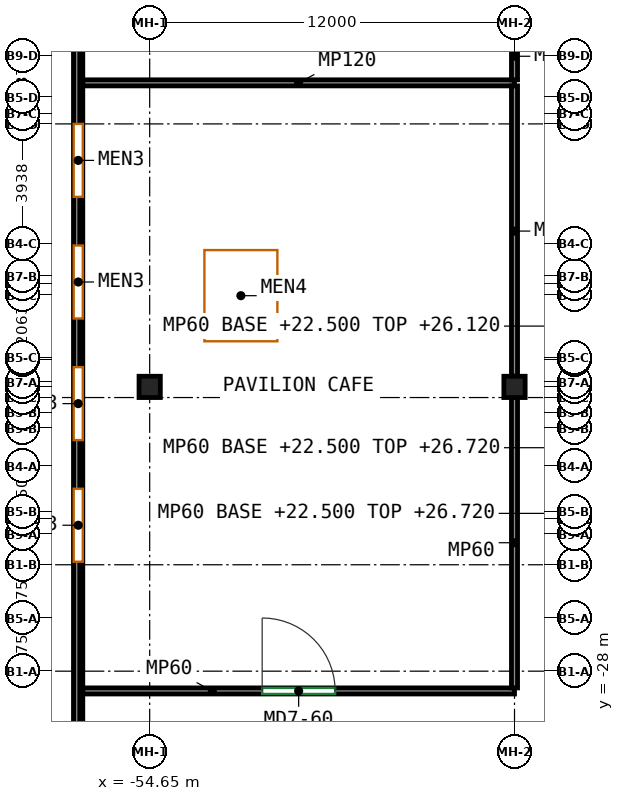
"""IFC4 building model, lengths in metres.
Left out: names, types, materials, properties, quantities, classifications, styles, units other than length and angle.
Written with IfcOpenShell. Run it as: python <this file> out.ifc"""

import sys

from ifc_helpers import new_model, si_unit, direction, frame, frame_2d, origin, origin_2d, place, context, subcontext, project, spatial, rectangle, extrude, source, transform, mapped, element, fill, save


model = new_model("IFC4")
c1 = context("Model", 3, precision=1e-05, world=origin(), true_north=direction((0.0, 1.0)))
c2 = subcontext(c1, "Body", "Model", "MODEL_VIEW")
j1 = project(units=[si_unit("LENGTHUNIT", "METRE"), si_unit("PLANEANGLEUNIT", "RADIAN")], contexts=[c1])
p1 = place(None, origin())
s1 = spatial("IfcSite", under=j1, at=p1, CompositionType="ELEMENT")
p2 = place(p1, origin())
s2 = spatial("IfcBuilding", under=s1, at=p2, CompositionType="ELEMENT")
p3 = place(p2, frame((0.0, 0.0, 22.5)))
s3 = spatial("IfcBuildingStorey", under=s2, at=p3, CompositionType="ELEMENT", Elevation=22.5)
m1 = source(origin(), c2, "Body", "SweptSolid", [
    extrude(rectangle(XDim=0.7, YDim=0.7, at=origin_2d()), origin(), (0.0, 0.0, 1.0), 4.22),
])
for number, where, z_axis, x_axis in (
    (1, (-54.65, -18.65, 0.0), (0.0, 0.0, 1.0), (1.0, 0.0, 0.0)),
    (2, (-42.65, -18.65, 0.0), (0.0, 0.0, 1.0), (1.0, 0.0, 0.0)),
):
    element("IfcColumn", number, at=place(p3, frame(where, z_axis=z_axis, x_axis=x_axis)), inside=s3, PredefinedType="COLUMN", context=c2, shape_type="MappedRepresentation", body=[
        mapped(m1, transform((0.0, 0.0, 0.0))),
    ])
m2 = source(origin(), c2, "Body", "SweptSolid", [
    extrude(rectangle(XDim=100.7, YDim=0.3, at=frame_2d((50.35, 0.0))), origin(), (0.0, 0.0, 1.0), 4.22),
])
p4 = place(p3, frame((-57.0, -43.55, 0.0), z_axis=(0.0, 0.0, 1.0), x_axis=(0.0, 1.0, 0.0)))
e3 = element("IfcWall", 3, at=p4, inside=s3, PredefinedType="SOLIDWALL", context=c2, shape_type="MappedRepresentation", body=[
    mapped(m2, transform((0.0, 0.0, 0.0))),
])
p5 = place(p4, frame((3.15, 0.0, 0.9)))
e4 = element("IfcOpeningElement", 4, at=p5, cuts=e3, PredefinedType="OPENING", context=c2, shape_type="SweptSolid", body=[
    extrude(rectangle(XDim=2.4, YDim=1.8, at=frame_2d((1.2, 0.9))), frame((0.0, 0.16, 0.0), z_axis=(0.0, -1.0, 0.0), x_axis=(1.0, 0.0, 0.0)), (0.0, 0.0, 1.0), 0.32),
])
p6 = place(p4, frame((7.15, 0.0, 0.9)))
e5 = element("IfcOpeningElement", 5, at=p6, cuts=e3, PredefinedType="OPENING", context=c2, shape_type="SweptSolid", body=[
    extrude(rectangle(XDim=2.4, YDim=1.8, at=frame_2d((1.2, 0.9))), frame((0.0, 0.16, 0.0), z_axis=(0.0, -1.0, 0.0), x_axis=(1.0, 0.0, 0.0)), (0.0, 0.0, 1.0), 0.32),
])
p7 = place(p4, frame((11.15, 0.0, 0.9)))
e6 = element("IfcOpeningElement", 6, at=p7, cuts=e3, PredefinedType="OPENING", context=c2, shape_type="SweptSolid", body=[
    extrude(rectangle(XDim=2.4, YDim=1.8, at=frame_2d((1.2, 0.9))), frame((0.0, 0.16, 0.0), z_axis=(0.0, -1.0, 0.0), x_axis=(1.0, 0.0, 0.0)), (0.0, 0.0, 1.0), 0.32),
])
p8 = place(p4, frame((19.15, 0.0, 0.9)))
e7 = element("IfcOpeningElement", 7, at=p8, cuts=e3, PredefinedType="OPENING", context=c2, shape_type="SweptSolid", body=[
    extrude(rectangle(XDim=2.4, YDim=1.8, at=frame_2d((1.2, 0.9))), frame((0.0, 0.16, 0.0), z_axis=(0.0, -1.0, 0.0), x_axis=(1.0, 0.0, 0.0)), (0.0, 0.0, 1.0), 0.32),
])
p9 = place(p4, frame((23.15, 0.0, 0.9)))
e8 = element("IfcOpeningElement", 8, at=p9, cuts=e3, PredefinedType="OPENING", context=c2, shape_type="SweptSolid", body=[
    extrude(rectangle(XDim=2.4, YDim=1.8, at=frame_2d((1.2, 0.9))), frame((0.0, 0.16, 0.0), z_axis=(0.0, -1.0, 0.0), x_axis=(1.0, 0.0, 0.0)), (0.0, 0.0, 1.0), 0.32),
])
p10 = place(p4, frame((27.15, 0.0, 0.9)))
e9 = element("IfcOpeningElement", 9, at=p10, cuts=e3, PredefinedType="OPENING", context=c2, shape_type="SweptSolid", body=[
    extrude(rectangle(XDim=2.4, YDim=1.8, at=frame_2d((1.2, 0.9))), frame((0.0, 0.16, 0.0), z_axis=(0.0, -1.0, 0.0), x_axis=(1.0, 0.0, 0.0)), (0.0, 0.0, 1.0), 0.32),
])
p11 = place(p4, frame((31.15, 0.0, 0.9)))
e10 = element("IfcOpeningElement", 10, at=p11, cuts=e3, PredefinedType="OPENING", context=c2, shape_type="SweptSolid", body=[
    extrude(rectangle(XDim=2.4, YDim=1.8, at=frame_2d((1.2, 0.9))), frame((0.0, 0.16, 0.0), z_axis=(0.0, -1.0, 0.0), x_axis=(1.0, 0.0, 0.0)), (0.0, 0.0, 1.0), 0.32),
])
p12 = place(p4, frame((39.15, 0.0, 0.9)))
e11 = element("IfcOpeningElement", 11, at=p12, cuts=e3, PredefinedType="OPENING", context=c2, shape_type="SweptSolid", body=[
    extrude(rectangle(XDim=2.4, YDim=1.8, at=frame_2d((1.2, 0.9))), frame((0.0, 0.16, 0.0), z_axis=(0.0, -1.0, 0.0), x_axis=(1.0, 0.0, 0.0)), (0.0, 0.0, 1.0), 0.32),
])
p13 = place(p4, frame((43.15, 0.0, 0.9)))
e12 = element("IfcOpeningElement", 12, at=p13, cuts=e3, PredefinedType="OPENING", context=c2, shape_type="SweptSolid", body=[
    extrude(rectangle(XDim=2.4, YDim=1.8, at=frame_2d((1.2, 0.9))), frame((0.0, 0.16, 0.0), z_axis=(0.0, -1.0, 0.0), x_axis=(1.0, 0.0, 0.0)), (0.0, 0.0, 1.0), 0.32),
])
p14 = place(p4, frame((51.15, 0.0, 0.9)))
e13 = element("IfcOpeningElement", 13, at=p14, cuts=e3, PredefinedType="OPENING", context=c2, shape_type="SweptSolid", body=[
    extrude(rectangle(XDim=2.4, YDim=1.8, at=frame_2d((1.2, 0.9))), frame((0.0, 0.16, 0.0), z_axis=(0.0, -1.0, 0.0), x_axis=(1.0, 0.0, 0.0)), (0.0, 0.0, 1.0), 0.32),
])
p15 = place(p4, frame((55.15, 0.0, 0.9)))
e14 = element("IfcOpeningElement", 14, at=p15, cuts=e3, PredefinedType="OPENING", context=c2, shape_type="SweptSolid", body=[
    extrude(rectangle(XDim=2.4, YDim=1.8, at=frame_2d((1.2, 0.9))), frame((0.0, 0.16, 0.0), z_axis=(0.0, -1.0, 0.0), x_axis=(1.0, 0.0, 0.0)), (0.0, 0.0, 1.0), 0.32),
])
p16 = place(p4, frame((59.15, 0.0, 0.9)))
e15 = element("IfcOpeningElement", 15, at=p16, cuts=e3, PredefinedType="OPENING", context=c2, shape_type="SweptSolid", body=[
    extrude(rectangle(XDim=2.4, YDim=1.8, at=frame_2d((1.2, 0.9))), frame((0.0, 0.16, 0.0), z_axis=(0.0, -1.0, 0.0), x_axis=(1.0, 0.0, 0.0)), (0.0, 0.0, 1.0), 0.32),
])
p17 = place(p4, frame((63.15, 0.0, 0.9)))
e16 = element("IfcOpeningElement", 16, at=p17, cuts=e3, PredefinedType="OPENING", context=c2, shape_type="SweptSolid", body=[
    extrude(rectangle(XDim=2.4, YDim=1.8, at=frame_2d((1.2, 0.9))), frame((0.0, 0.16, 0.0), z_axis=(0.0, -1.0, 0.0), x_axis=(1.0, 0.0, 0.0)), (0.0, 0.0, 1.0), 0.32),
])
p18 = place(p4, frame((67.15, 0.0, 0.9)))
e17 = element("IfcOpeningElement", 17, at=p18, cuts=e3, PredefinedType="OPENING", context=c2, shape_type="SweptSolid", body=[
    extrude(rectangle(XDim=2.4, YDim=1.8, at=frame_2d((1.2, 0.9))), frame((0.0, 0.16, 0.0), z_axis=(0.0, -1.0, 0.0), x_axis=(1.0, 0.0, 0.0)), (0.0, 0.0, 1.0), 0.32),
])
p19 = place(p4, frame((75.15, 0.0, 0.9)))
e18 = element("IfcOpeningElement", 18, at=p19, cuts=e3, PredefinedType="OPENING", context=c2, shape_type="SweptSolid", body=[
    extrude(rectangle(XDim=2.4, YDim=1.8, at=frame_2d((1.2, 0.9))), frame((0.0, 0.16, 0.0), z_axis=(0.0, -1.0, 0.0), x_axis=(1.0, 0.0, 0.0)), (0.0, 0.0, 1.0), 0.32),
])
p20 = place(p4, frame((79.15, 0.0, 0.9)))
e19 = element("IfcOpeningElement", 19, at=p20, cuts=e3, PredefinedType="OPENING", context=c2, shape_type="SweptSolid", body=[
    extrude(rectangle(XDim=2.4, YDim=1.8, at=frame_2d((1.2, 0.9))), frame((0.0, 0.16, 0.0), z_axis=(0.0, -1.0, 0.0), x_axis=(1.0, 0.0, 0.0)), (0.0, 0.0, 1.0), 0.32),
])
p21 = place(p4, frame((83.15, 0.0, 0.9)))
e20 = element("IfcOpeningElement", 20, at=p21, cuts=e3, PredefinedType="OPENING", context=c2, shape_type="SweptSolid", body=[
    extrude(rectangle(XDim=2.4, YDim=1.8, at=frame_2d((1.2, 0.9))), frame((0.0, 0.16, 0.0), z_axis=(0.0, -1.0, 0.0), x_axis=(1.0, 0.0, 0.0)), (0.0, 0.0, 1.0), 0.32),
])
p22 = place(p4, frame((87.15, 0.0, 0.9)))
e21 = element("IfcOpeningElement", 21, at=p22, cuts=e3, PredefinedType="OPENING", context=c2, shape_type="SweptSolid", body=[
    extrude(rectangle(XDim=2.4, YDim=1.8, at=frame_2d((1.2, 0.9))), frame((0.0, 0.16, 0.0), z_axis=(0.0, -1.0, 0.0), x_axis=(1.0, 0.0, 0.0)), (0.0, 0.0, 1.0), 0.32),
])
p23 = place(p4, frame((91.15, 0.0, 0.9)))
e22 = element("IfcOpeningElement", 22, at=p23, cuts=e3, PredefinedType="OPENING", context=c2, shape_type="SweptSolid", body=[
    extrude(rectangle(XDim=2.4, YDim=1.8, at=frame_2d((1.2, 0.9))), frame((0.0, 0.16, 0.0), z_axis=(0.0, -1.0, 0.0), x_axis=(1.0, 0.0, 0.0)), (0.0, 0.0, 1.0), 0.32),
])
p24 = place(p4, frame((95.15, 0.0, 0.9)))
e23 = element("IfcOpeningElement", 23, at=p24, cuts=e3, PredefinedType="OPENING", context=c2, shape_type="SweptSolid", body=[
    extrude(rectangle(XDim=2.4, YDim=1.8, at=frame_2d((1.2, 0.9))), frame((0.0, 0.16, 0.0), z_axis=(0.0, -1.0, 0.0), x_axis=(1.0, 0.0, 0.0)), (0.0, 0.0, 1.0), 0.32),
])
m3 = source(origin(), c2, "Body", "SweptSolid", [
    extrude(rectangle(XDim=100.8, YDim=0.2, at=frame_2d((50.4, 0.0))), origin(), (0.0, 0.0, 1.0), 1.1),
])
p25 = place(p3, frame((-57.05, -43.65, 4.5), z_axis=(0.0, 0.0, 1.0), x_axis=(0.0, 1.0, 0.0)))
e24 = element("IfcWall", 24, at=p25, inside=s3, PredefinedType="PARAPET", context=c2, shape_type="MappedRepresentation", body=[
    mapped(m3, transform((0.0, 0.0, 0.0))),
])
m4 = source(origin(), c2, "Body", "SweptSolid", [
    extrude(rectangle(XDim=14.2, YDim=0.2, at=frame_2d((7.1, 0.0))), origin(), (0.0, 0.0, 1.0), 3.42),
])
p26 = place(p3, frame((-56.85, -28.65, 0.0), z_axis=(0.0, 0.0, 1.0), x_axis=(1.0, 0.0, 0.0)))
e25 = element("IfcWall", 25, at=p26, inside=s3, PredefinedType="PARTITIONING", context=c2, shape_type="MappedRepresentation", body=[
    mapped(m4, transform((0.0, 0.0, 0.0))),
])
p27 = place(p26, frame((5.9, 0.0, 0.0)))
e26 = element("IfcOpeningElement", 26, at=p27, cuts=e25, PredefinedType="OPENING", context=c2, shape_type="SweptSolid", body=[
    extrude(rectangle(XDim=2.4, YDim=2.4, at=frame_2d((1.2, 1.2))), frame((0.0, 0.11, 0.0), z_axis=(0.0, -1.0, 0.0), x_axis=(1.0, 0.0, 0.0)), (0.0, 0.0, 1.0), 0.22),
])
p28 = place(p3, frame((-56.85, -8.65, 0.0), z_axis=(0.0, 0.0, 1.0), x_axis=(1.0, 0.0, 0.0)))
e27 = element("IfcWall", 27, at=p28, inside=s3, PredefinedType="PARTITIONING", context=c2, shape_type="MappedRepresentation", body=[
    mapped(m4, transform((0.0, 0.0, 0.0))),
])
m5 = source(origin(), c2, "Body", "SweptSolid", [
    extrude(rectangle(XDim=9.55, YDim=0.2, at=frame_2d((4.775, 0.0))), origin(), (0.0, 0.0, 1.0), 3.42),
])
for number, where, z_axis, x_axis in (
    (28, (-42.65, -28.55, 0.0), (0.0, 0.0, 1.0), (0.0, 1.0, 0.0)),
    (29, (-42.65, -18.3, 0.0), (0.0, 0.0, 1.0), (0.0, 1.0, 0.0)),
):
    element("IfcWall", number, at=place(p3, frame(where, z_axis=z_axis, x_axis=x_axis)), inside=s3, PredefinedType="PARTITIONING", context=c2, shape_type="MappedRepresentation", body=[
        mapped(m5, transform((0.0, 0.0, 0.0))),
    ])
m6 = source(origin(), c2, "Body", "SweptSolid", [
    extrude(rectangle(XDim=1.55, YDim=0.2, at=frame_2d((0.775, 0.0))), origin(), (0.0, 0.0, 1.0), 3.42),
])
p29 = place(p3, frame((-42.65, -8.55, 0.0), z_axis=(0.0, 0.0, 1.0), x_axis=(0.0, 1.0, 0.0)))
e30 = element("IfcWall", 30, at=p29, inside=s3, PredefinedType="PARTITIONING", context=c2, shape_type="MappedRepresentation", body=[
    mapped(m6, transform((0.0, 0.0, 0.0))),
])
p30 = place(p8, origin())
e31 = element("IfcWindow", 31, at=p30, inside=s3, PartitioningType="SINGLE_PANEL", PredefinedType="WINDOW", context=c2, shape_type="SweptSolid", body=[
    extrude(rectangle(XDim=2.4, YDim=1.8, at=frame_2d((1.2, 0.9))), frame((0.0, 0.03, 0.0), z_axis=(0.0, -1.0, 0.0), x_axis=(1.0, 0.0, 0.0)), (0.0, 0.0, 1.0), 0.06),
])
fill(e7, e31)
p31 = place(p9, origin())
e32 = element("IfcWindow", 32, at=p31, inside=s3, PartitioningType="SINGLE_PANEL", PredefinedType="WINDOW", context=c2, shape_type="SweptSolid", body=[
    extrude(rectangle(XDim=2.4, YDim=1.8, at=frame_2d((1.2, 0.9))), frame((0.0, 0.03, 0.0), z_axis=(0.0, -1.0, 0.0), x_axis=(1.0, 0.0, 0.0)), (0.0, 0.0, 1.0), 0.06),
])
fill(e8, e32)
p32 = place(p10, origin())
e33 = element("IfcWindow", 33, at=p32, inside=s3, PartitioningType="SINGLE_PANEL", PredefinedType="WINDOW", context=c2, shape_type="SweptSolid", body=[
    extrude(rectangle(XDim=2.4, YDim=1.8, at=frame_2d((1.2, 0.9))), frame((0.0, 0.03, 0.0), z_axis=(0.0, -1.0, 0.0), x_axis=(1.0, 0.0, 0.0)), (0.0, 0.0, 1.0), 0.06),
])
fill(e9, e33)
p33 = place(p11, origin())
e34 = element("IfcWindow", 34, at=p33, inside=s3, PartitioningType="SINGLE_PANEL", PredefinedType="WINDOW", context=c2, shape_type="SweptSolid", body=[
    extrude(rectangle(XDim=2.4, YDim=1.8, at=frame_2d((1.2, 0.9))), frame((0.0, 0.03, 0.0), z_axis=(0.0, -1.0, 0.0), x_axis=(1.0, 0.0, 0.0)), (0.0, 0.0, 1.0), 0.06),
])
fill(e10, e34)
p34 = place(p2, frame((0.0, 0.0, 27.0)))
p35 = place(p34, frame((0.0, 0.0, -0.28)))
p36 = place(p35, frame((-51.65, -15.65, 0.0)))
p37 = place(p36, frame((0.0, 0.0, 0.23)))
e35 = element("IfcWindow", 35, at=p37, inside=s3, PartitioningType="SINGLE_PANEL", PredefinedType="SKYLIGHT", context=c2, shape_type="SweptSolid", body=[
    extrude(rectangle(XDim=2.4, YDim=3.0, at=origin_2d()), origin(), (0.0, 0.0, 1.0), 0.05),
])
p38 = place(p27, origin())
e36 = element("IfcDoor", 36, at=p38, inside=s3, OperationType="DOUBLE_DOOR_SINGLE_SWING", PredefinedType="DOOR", context=c2, shape_type="SweptSolid", body=[
    extrude(rectangle(XDim=2.4, YDim=2.4, at=frame_2d((1.2, 1.2))), frame((0.0, 0.025, 0.0), z_axis=(0.0, -1.0, 0.0), x_axis=(1.0, 0.0, 0.0)), (0.0, 0.0, 1.0), 0.05),
])
fill(e26, e36)
save(model, sys.argv[1])
